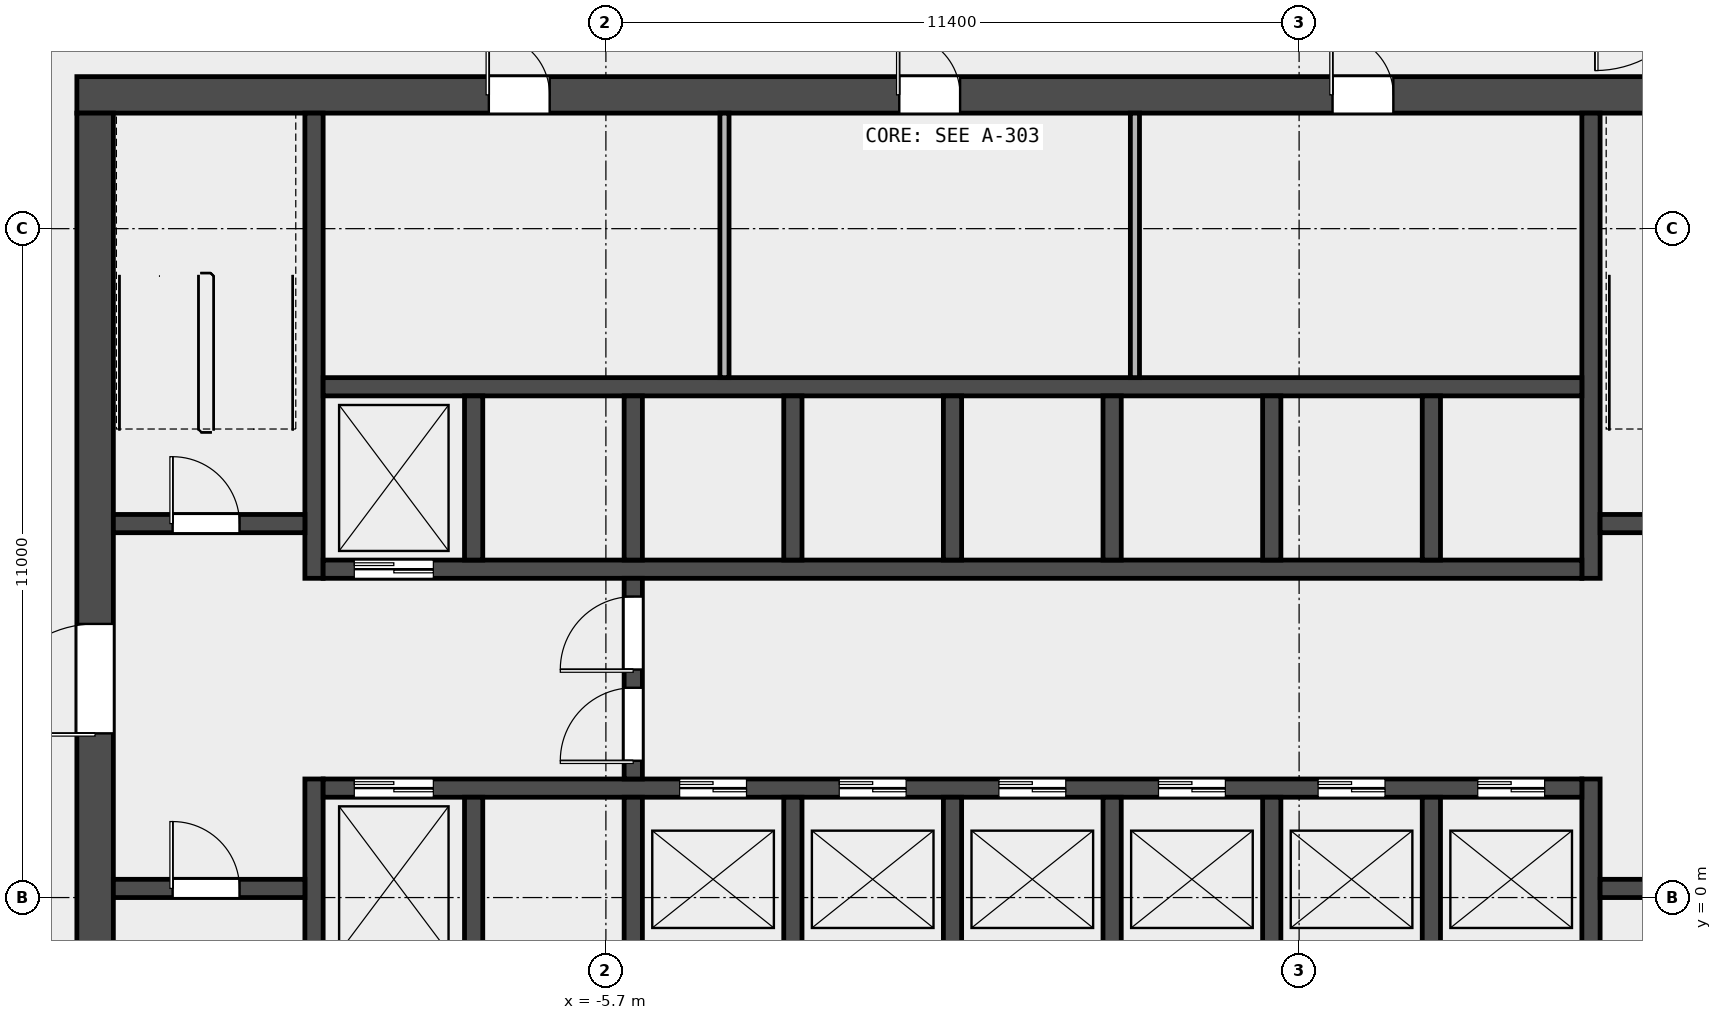
"""IFC4 building model, lengths in metres.
Left out: names, types, materials, properties, quantities, classifications, styles, units other than length and angle.
Written with IfcOpenShell. Run it as: python <this file> out.ifc"""

import sys

from ifc_helpers import new_model, si_unit, direction, frame, frame_2d, origin, place, context, subcontext, project, spatial, rectangle, extrude, element, fill, save


model = new_model("IFC4")
c1 = context("Model", 3, precision=1e-05, world=origin(), true_north=direction((0.0, 1.0)))
c2 = subcontext(c1, "Body", "Model", "MODEL_VIEW")
j1 = project(units=[si_unit("LENGTHUNIT", "METRE"), si_unit("PLANEANGLEUNIT", "RADIAN")], contexts=[c1])
p1 = place(None, origin())
s1 = spatial("IfcSite", under=j1, at=p1, CompositionType="ELEMENT")
p2 = place(p1, origin())
s2 = spatial("IfcBuilding", under=s1, at=p2, CompositionType="ELEMENT")
p3 = place(p2, frame((0.0, 0.0, 25.5)))
s3 = spatial("IfcBuildingStorey", under=s2, at=p3, CompositionType="ELEMENT", Elevation=25.5)
p4 = place(p3, frame((-14.4, 13.2, 0.0), z_axis=(0.0, 0.0, 1.0), x_axis=(1.0, 0.0, 0.0)))
e1 = element("IfcWall", 1, at=p4, inside=s3, PredefinedType="SHEAR", context=c2, shape_type="SweptSolid", body=[
    extrude(rectangle(XDim=28.8, YDim=0.6, at=frame_2d((14.4, 0.0))), origin(), (0.0, 0.0, 1.0), 5.2),
])
p5 = place(p4, frame((6.775, 0.0, 0.0)))
e2 = element("IfcOpeningElement", 2, at=p5, cuts=e1, PredefinedType="OPENING", context=c2, shape_type="SweptSolid", body=[
    extrude(rectangle(XDim=1.0, YDim=2.1, at=frame_2d((0.5, 1.05))), frame((0.0, 0.312, 0.0), z_axis=(0.0, -1.0, 0.0), x_axis=(1.0, 0.0, 0.0)), (0.0, 0.0, 1.0), 0.624),
])
p6 = place(p4, frame((13.525, 0.0, 0.0)))
e3 = element("IfcOpeningElement", 3, at=p6, cuts=e1, PredefinedType="OPENING", context=c2, shape_type="SweptSolid", body=[
    extrude(rectangle(XDim=1.0, YDim=2.1, at=frame_2d((0.5, 1.05))), frame((0.0, 0.312, 0.0), z_axis=(0.0, -1.0, 0.0), x_axis=(1.0, 0.0, 0.0)), (0.0, 0.0, 1.0), 0.624),
])
p7 = place(p4, frame((20.65, 0.0, 0.0)))
e4 = element("IfcOpeningElement", 4, at=p7, cuts=e1, PredefinedType="OPENING", context=c2, shape_type="SweptSolid", body=[
    extrude(rectangle(XDim=1.0, YDim=2.1, at=frame_2d((0.5, 1.05))), frame((0.0, 0.312, 0.0), z_axis=(0.0, -1.0, 0.0), x_axis=(1.0, 0.0, 0.0)), (0.0, 0.0, 1.0), 0.624),
])
p8 = place(p3, frame((-14.1, -6.6, 0.0), z_axis=(0.0, 0.0, 1.0), x_axis=(0.0, 1.0, 0.0)))
e5 = element("IfcWall", 5, at=p8, inside=s3, PredefinedType="SHEAR", context=c2, shape_type="SweptSolid", body=[
    extrude(rectangle(XDim=19.5, YDim=0.6, at=frame_2d((9.75, 0.0))), origin(), (0.0, 0.0, 1.0), 5.2),
])
p9 = place(p8, frame((9.3, 0.0, 0.0)))
e6 = element("IfcOpeningElement", 6, at=p9, cuts=e5, PredefinedType="OPENING", context=c2, shape_type="SweptSolid", body=[
    extrude(rectangle(XDim=1.8, YDim=2.1, at=frame_2d((0.9, 1.05))), frame((0.0, 0.312, 0.0), z_axis=(0.0, -1.0, 0.0), x_axis=(1.0, 0.0, 0.0)), (0.0, 0.0, 1.0), 0.624),
])
p10 = place(p3, frame((-10.5, -6.6, 0.0), z_axis=(0.0, 0.0, 1.0), x_axis=(0.0, 1.0, 0.0)))
e7 = element("IfcWall", 7, at=p10, inside=s3, PredefinedType="SHEAR", context=c2, shape_type="SweptSolid", body=[
    extrude(rectangle(XDim=8.55, YDim=0.3, at=frame_2d((4.275, 0.0))), origin(), (0.0, 0.0, 1.0), 5.2),
])
p11 = place(p3, frame((-10.5, 5.25, 0.0), z_axis=(0.0, 0.0, 1.0), x_axis=(0.0, 1.0, 0.0)))
e8 = element("IfcWall", 8, at=p11, inside=s3, PredefinedType="SHEAR", context=c2, shape_type="SweptSolid", body=[
    extrude(rectangle(XDim=7.65, YDim=0.3, at=frame_2d((3.825, 0.0))), origin(), (0.0, 0.0, 1.0), 5.2),
])
p12 = place(p3, frame((10.5, -6.6, 0.0), z_axis=(0.0, 0.0, 1.0), x_axis=(0.0, 1.0, 0.0)))
e9 = element("IfcWall", 9, at=p12, inside=s3, PredefinedType="SHEAR", context=c2, shape_type="SweptSolid", body=[
    extrude(rectangle(XDim=8.55, YDim=0.3, at=frame_2d((4.275, 0.0))), origin(), (0.0, 0.0, 1.0), 5.2),
])
p13 = place(p3, frame((10.5, 5.25, 0.0), z_axis=(0.0, 0.0, 1.0), x_axis=(0.0, 1.0, 0.0)))
e10 = element("IfcWall", 10, at=p13, inside=s3, PredefinedType="SHEAR", context=c2, shape_type="SweptSolid", body=[
    extrude(rectangle(XDim=7.65, YDim=0.3, at=frame_2d((3.825, 0.0))), origin(), (0.0, 0.0, 1.0), 5.2),
])
p14 = place(p3, frame((-13.8, 0.15, 0.0), z_axis=(0.0, 0.0, 1.0), x_axis=(1.0, 0.0, 0.0)))
e11 = element("IfcWall", 11, at=p14, inside=s3, PredefinedType="SOLIDWALL", context=c2, shape_type="SweptSolid", body=[
    extrude(rectangle(XDim=3.15, YDim=0.3, at=frame_2d((1.575, 0.0))), origin(), (0.0, 0.0, 1.0), 5.2),
])
p15 = place(p14, frame((0.975, 0.0, 0.0)))
e12 = element("IfcOpeningElement", 12, at=p15, cuts=e11, PredefinedType="OPENING", context=c2, shape_type="SweptSolid", body=[
    extrude(rectangle(XDim=1.1, YDim=2.1, at=frame_2d((0.55, 1.05))), frame((0.0, 0.162, 0.0), z_axis=(0.0, -1.0, 0.0), x_axis=(1.0, 0.0, 0.0)), (0.0, 0.0, 1.0), 0.324),
])
p16 = place(p3, frame((-13.8, 6.15, 0.0), z_axis=(0.0, 0.0, 1.0), x_axis=(1.0, 0.0, 0.0)))
e13 = element("IfcWall", 13, at=p16, inside=s3, PredefinedType="SOLIDWALL", context=c2, shape_type="SweptSolid", body=[
    extrude(rectangle(XDim=3.15, YDim=0.3, at=frame_2d((1.575, 0.0))), origin(), (0.0, 0.0, 1.0), 5.2),
])
p17 = place(p16, frame((0.975, 0.0, 0.0)))
e14 = element("IfcOpeningElement", 14, at=p17, cuts=e13, PredefinedType="OPENING", context=c2, shape_type="SweptSolid", body=[
    extrude(rectangle(XDim=1.1, YDim=2.1, at=frame_2d((0.55, 1.05))), frame((0.0, 0.162, 0.0), z_axis=(0.0, -1.0, 0.0), x_axis=(1.0, 0.0, 0.0)), (0.0, 0.0, 1.0), 0.324),
])
p18 = place(p3, frame((10.65, 0.15, 0.0), z_axis=(0.0, 0.0, 1.0), x_axis=(1.0, 0.0, 0.0)))
e15 = element("IfcWall", 15, at=p18, inside=s3, PredefinedType="SOLIDWALL", context=c2, shape_type="SweptSolid", body=[
    extrude(rectangle(XDim=3.15, YDim=0.3, at=frame_2d((1.575, 0.0))), origin(), (0.0, 0.0, 1.0), 5.2),
])
p19 = place(p18, frame((1.025, 0.0, 0.0)))
e16 = element("IfcOpeningElement", 16, at=p19, cuts=e15, PredefinedType="OPENING", context=c2, shape_type="SweptSolid", body=[
    extrude(rectangle(XDim=1.1, YDim=2.1, at=frame_2d((0.55, 1.05))), frame((0.0, 0.162, 0.0), z_axis=(0.0, -1.0, 0.0), x_axis=(1.0, 0.0, 0.0)), (0.0, 0.0, 1.0), 0.324),
])
p20 = place(p3, frame((10.65, 6.15, 0.0), z_axis=(0.0, 0.0, 1.0), x_axis=(1.0, 0.0, 0.0)))
e17 = element("IfcWall", 17, at=p20, inside=s3, PredefinedType="SOLIDWALL", context=c2, shape_type="SweptSolid", body=[
    extrude(rectangle(XDim=3.15, YDim=0.3, at=frame_2d((1.575, 0.0))), origin(), (0.0, 0.0, 1.0), 5.2),
])
p21 = place(p20, frame((1.025, 0.0, 0.0)))
e18 = element("IfcOpeningElement", 18, at=p21, cuts=e17, PredefinedType="OPENING", context=c2, shape_type="SweptSolid", body=[
    extrude(rectangle(XDim=1.1, YDim=2.1, at=frame_2d((0.55, 1.05))), frame((0.0, 0.162, 0.0), z_axis=(0.0, -1.0, 0.0), x_axis=(1.0, 0.0, 0.0)), (0.0, 0.0, 1.0), 0.324),
])
p22 = place(p3, frame((-10.35, 1.8, 0.0), z_axis=(0.0, 0.0, 1.0), x_axis=(1.0, 0.0, 0.0)))
e19 = element("IfcWall", 19, at=p22, inside=s3, PredefinedType="SOLIDWALL", context=c2, shape_type="SweptSolid", body=[
    extrude(rectangle(XDim=20.7, YDim=0.3, at=frame_2d((10.35, 0.0))), origin(), (0.0, 0.0, 1.0), 5.2),
])
p23 = place(p22, frame((0.512, 0.0, 0.0)))
e20 = element("IfcOpeningElement", 20, at=p23, cuts=e19, PredefinedType="OPENING", context=c2, shape_type="SweptSolid", body=[
    extrude(rectangle(XDim=1.3, YDim=2.1, at=frame_2d((0.65, 1.05))), frame((0.0, 0.162, 0.0), z_axis=(0.0, -1.0, 0.0), x_axis=(1.0, 0.0, 0.0)), (0.0, 0.0, 1.0), 0.324),
])
p24 = place(p22, frame((5.863, 0.0, 0.0)))
e21 = element("IfcOpeningElement", 21, at=p24, cuts=e19, PredefinedType="OPENING", context=c2, shape_type="SweptSolid", body=[
    extrude(rectangle(XDim=1.1, YDim=2.1, at=frame_2d((0.55, 1.05))), frame((0.0, 0.162, 0.0), z_axis=(0.0, -1.0, 0.0), x_axis=(1.0, 0.0, 0.0)), (0.0, 0.0, 1.0), 0.324),
])
p25 = place(p22, frame((8.488, 0.0, 0.0)))
e22 = element("IfcOpeningElement", 22, at=p25, cuts=e19, PredefinedType="OPENING", context=c2, shape_type="SweptSolid", body=[
    extrude(rectangle(XDim=1.1, YDim=2.1, at=frame_2d((0.55, 1.05))), frame((0.0, 0.162, 0.0), z_axis=(0.0, -1.0, 0.0), x_axis=(1.0, 0.0, 0.0)), (0.0, 0.0, 1.0), 0.324),
])
p26 = place(p22, frame((11.113, 0.0, 0.0)))
e23 = element("IfcOpeningElement", 23, at=p26, cuts=e19, PredefinedType="OPENING", context=c2, shape_type="SweptSolid", body=[
    extrude(rectangle(XDim=1.1, YDim=2.1, at=frame_2d((0.55, 1.05))), frame((0.0, 0.162, 0.0), z_axis=(0.0, -1.0, 0.0), x_axis=(1.0, 0.0, 0.0)), (0.0, 0.0, 1.0), 0.324),
])
p27 = place(p22, frame((13.738, 0.0, 0.0)))
e24 = element("IfcOpeningElement", 24, at=p27, cuts=e19, PredefinedType="OPENING", context=c2, shape_type="SweptSolid", body=[
    extrude(rectangle(XDim=1.1, YDim=2.1, at=frame_2d((0.55, 1.05))), frame((0.0, 0.162, 0.0), z_axis=(0.0, -1.0, 0.0), x_axis=(1.0, 0.0, 0.0)), (0.0, 0.0, 1.0), 0.324),
])
p28 = place(p22, frame((16.363, 0.0, 0.0)))
e25 = element("IfcOpeningElement", 25, at=p28, cuts=e19, PredefinedType="OPENING", context=c2, shape_type="SweptSolid", body=[
    extrude(rectangle(XDim=1.1, YDim=2.1, at=frame_2d((0.55, 1.05))), frame((0.0, 0.162, 0.0), z_axis=(0.0, -1.0, 0.0), x_axis=(1.0, 0.0, 0.0)), (0.0, 0.0, 1.0), 0.324),
])
p29 = place(p22, frame((18.988, 0.0, 0.0)))
e26 = element("IfcOpeningElement", 26, at=p29, cuts=e19, PredefinedType="OPENING", context=c2, shape_type="SweptSolid", body=[
    extrude(rectangle(XDim=1.1, YDim=2.1, at=frame_2d((0.55, 1.05))), frame((0.0, 0.162, 0.0), z_axis=(0.0, -1.0, 0.0), x_axis=(1.0, 0.0, 0.0)), (0.0, 0.0, 1.0), 0.324),
])
p30 = place(p3, frame((-10.35, 5.4, 0.0), z_axis=(0.0, 0.0, 1.0), x_axis=(1.0, 0.0, 0.0)))
e27 = element("IfcWall", 27, at=p30, inside=s3, PredefinedType="SOLIDWALL", context=c2, shape_type="SweptSolid", body=[
    extrude(rectangle(XDim=20.7, YDim=0.3, at=frame_2d((10.35, 0.0))), origin(), (0.0, 0.0, 1.0), 5.2),
])
p31 = place(p30, frame((0.512, 0.0, 0.0)))
e28 = element("IfcOpeningElement", 28, at=p31, cuts=e27, PredefinedType="OPENING", context=c2, shape_type="SweptSolid", body=[
    extrude(rectangle(XDim=1.3, YDim=2.1, at=frame_2d((0.65, 1.05))), frame((0.0, 0.162, 0.0), z_axis=(0.0, -1.0, 0.0), x_axis=(1.0, 0.0, 0.0)), (0.0, 0.0, 1.0), 0.324),
])
p32 = place(p3, frame((-10.35, 8.4, 0.0), z_axis=(0.0, 0.0, 1.0), x_axis=(1.0, 0.0, 0.0)))
e29 = element("IfcWall", 29, at=p32, inside=s3, PredefinedType="SOLIDWALL", context=c2, shape_type="SweptSolid", body=[
    extrude(rectangle(XDim=20.7, YDim=0.3, at=frame_2d((10.35, 0.0))), origin(), (0.0, 0.0, 1.0), 5.2),
])
for number, where, z_axis, x_axis in (
    (30, (-7.875, -1.05, 0.0), (0.0, 0.0, 1.0), (0.0, 1.0, 0.0)),
    (31, (-5.25, -1.05, 0.0), (0.0, 0.0, 1.0), (0.0, 1.0, 0.0)),
    (32, (-2.625, -1.05, 0.0), (0.0, 0.0, 1.0), (0.0, 1.0, 0.0)),
    (33, (0.0, -1.05, 0.0), (0.0, 0.0, 1.0), (0.0, 1.0, 0.0)),
    (34, (2.625, -1.05, 0.0), (0.0, 0.0, 1.0), (0.0, 1.0, 0.0)),
    (35, (5.25, -1.05, 0.0), (0.0, 0.0, 1.0), (0.0, 1.0, 0.0)),
    (36, (7.875, -1.05, 0.0), (0.0, 0.0, 1.0), (0.0, 1.0, 0.0)),
    (37, (-7.875, 5.55, 0.0), (0.0, 0.0, 1.0), (0.0, 1.0, 0.0)),
    (38, (-5.25, 5.55, 0.0), (0.0, 0.0, 1.0), (0.0, 1.0, 0.0)),
    (39, (-2.625, 5.55, 0.0), (0.0, 0.0, 1.0), (0.0, 1.0, 0.0)),
    (40, (0.0, 5.55, 0.0), (0.0, 0.0, 1.0), (0.0, 1.0, 0.0)),
    (41, (2.625, 5.55, 0.0), (0.0, 0.0, 1.0), (0.0, 1.0, 0.0)),
    (42, (5.25, 5.55, 0.0), (0.0, 0.0, 1.0), (0.0, 1.0, 0.0)),
    (43, (7.875, 5.55, 0.0), (0.0, 0.0, 1.0), (0.0, 1.0, 0.0)),
):
    element("IfcWall", number, at=place(p3, frame(where, z_axis=z_axis, x_axis=x_axis)), inside=s3, PredefinedType="SOLIDWALL", context=c2, shape_type="SweptSolid", body=[
        extrude(rectangle(XDim=2.7, YDim=0.3, at=frame_2d((1.35, 0.0))), origin(), (0.0, 0.0, 1.0), 5.2),
    ])
p33 = place(p3, frame((-5.25, 1.95, 0.0), z_axis=(0.0, 0.0, 1.0), x_axis=(0.0, 1.0, 0.0)))
e44 = element("IfcWall", 44, at=p33, inside=s3, PredefinedType="SOLIDWALL", context=c2, shape_type="SweptSolid", body=[
    extrude(rectangle(XDim=3.3, YDim=0.3, at=frame_2d((1.65, 0.0))), origin(), (0.0, 0.0, 1.0), 5.2),
])
p34 = place(p33, frame((0.3, 0.0, 0.0)))
e45 = element("IfcOpeningElement", 45, at=p34, cuts=e44, PredefinedType="OPENING", context=c2, shape_type="SweptSolid", body=[
    extrude(rectangle(XDim=1.2, YDim=2.1, at=frame_2d((0.6, 1.05))), frame((0.0, 0.162, 0.0), z_axis=(0.0, -1.0, 0.0), x_axis=(1.0, 0.0, 0.0)), (0.0, 0.0, 1.0), 0.324),
])
p35 = place(p33, frame((1.8, 0.0, 0.0)))
e46 = element("IfcOpeningElement", 46, at=p35, cuts=e44, PredefinedType="OPENING", context=c2, shape_type="SweptSolid", body=[
    extrude(rectangle(XDim=1.2, YDim=2.1, at=frame_2d((0.6, 1.05))), frame((0.0, 0.162, 0.0), z_axis=(0.0, -1.0, 0.0), x_axis=(1.0, 0.0, 0.0)), (0.0, 0.0, 1.0), 0.324),
])
for number, where, z_axis, x_axis in (
    (47, (-3.75, 8.55, 0.0), (0.0, 0.0, 1.0), (0.0, 1.0, 0.0)),
    (48, (3.0, 8.55, 0.0), (0.0, 0.0, 1.0), (0.0, 1.0, 0.0)),
):
    element("IfcWall", number, at=place(p3, frame(where, z_axis=z_axis, x_axis=x_axis)), inside=s3, PredefinedType="PARTITIONING", context=c2, shape_type="SweptSolid", body=[
        extrude(rectangle(XDim=4.35, YDim=0.15, at=frame_2d((2.175, 0.0))), origin(), (0.0, 0.0, 1.0), 5.2),
    ])
p36 = place(p15, origin())
e49 = element("IfcDoor", 49, at=p36, inside=s3, OperationType="SINGLE_SWING_LEFT", PredefinedType="DOOR", context=c2, shape_type="SweptSolid", body=[
    extrude(rectangle(XDim=1.1, YDim=2.1, at=frame_2d((0.55, 1.05))), frame((0.0, 0.025, 0.0), z_axis=(0.0, -1.0, 0.0), x_axis=(1.0, 0.0, 0.0)), (0.0, 0.0, 1.0), 0.05),
])
fill(e12, e49)
p37 = place(p17, origin())
e50 = element("IfcDoor", 50, at=p37, inside=s3, OperationType="SINGLE_SWING_LEFT", PredefinedType="DOOR", context=c2, shape_type="SweptSolid", body=[
    extrude(rectangle(XDim=1.1, YDim=2.1, at=frame_2d((0.55, 1.05))), frame((0.0, 0.025, 0.0), z_axis=(0.0, -1.0, 0.0), x_axis=(1.0, 0.0, 0.0)), (0.0, 0.0, 1.0), 0.05),
])
fill(e14, e50)
p38 = place(p9, origin())
e51 = element("IfcDoor", 51, at=p38, inside=s3, OperationType="DOUBLE_DOOR_SINGLE_SWING", PredefinedType="DOOR", context=c2, shape_type="SweptSolid", body=[
    extrude(rectangle(XDim=1.8, YDim=2.1, at=frame_2d((0.9, 1.05))), frame((0.0, 0.025, 0.0), z_axis=(0.0, -1.0, 0.0), x_axis=(1.0, 0.0, 0.0)), (0.0, 0.0, 1.0), 0.05),
])
fill(e6, e51)
p39 = place(p34, origin())
e52 = element("IfcDoor", 52, at=p39, inside=s3, OperationType="SINGLE_SWING_LEFT", PredefinedType="DOOR", context=c2, shape_type="SweptSolid", body=[
    extrude(rectangle(XDim=1.2, YDim=2.1, at=frame_2d((0.6, 1.05))), frame((0.0, 0.025, 0.0), z_axis=(0.0, -1.0, 0.0), x_axis=(1.0, 0.0, 0.0)), (0.0, 0.0, 1.0), 0.05),
])
fill(e45, e52)
p40 = place(p35, origin())
e53 = element("IfcDoor", 53, at=p40, inside=s3, OperationType="SINGLE_SWING_RIGHT", PredefinedType="DOOR", context=c2, shape_type="SweptSolid", body=[
    extrude(rectangle(XDim=1.2, YDim=2.1, at=frame_2d((0.6, 1.05))), frame((0.0, 0.025, 0.0), z_axis=(0.0, -1.0, 0.0), x_axis=(1.0, 0.0, 0.0)), (0.0, 0.0, 1.0), 0.05),
])
fill(e46, e53)
p41 = place(p23, origin())
e54 = element("IfcDoor", 54, at=p41, inside=s3, OperationType="DOUBLE_DOOR_SLIDING", PredefinedType="DOOR", context=c2, shape_type="SweptSolid", body=[
    extrude(rectangle(XDim=1.3, YDim=2.1, at=frame_2d((0.65, 1.05))), frame((0.0, 0.025, 0.0), z_axis=(0.0, -1.0, 0.0), x_axis=(1.0, 0.0, 0.0)), (0.0, 0.0, 1.0), 0.05),
])
fill(e20, e54)
p42 = place(p24, origin())
e55 = element("IfcDoor", 55, at=p42, inside=s3, OperationType="DOUBLE_DOOR_SLIDING", PredefinedType="DOOR", context=c2, shape_type="SweptSolid", body=[
    extrude(rectangle(XDim=1.1, YDim=2.1, at=frame_2d((0.55, 1.05))), frame((0.0, 0.025, 0.0), z_axis=(0.0, -1.0, 0.0), x_axis=(1.0, 0.0, 0.0)), (0.0, 0.0, 1.0), 0.05),
])
fill(e21, e55)
p43 = place(p25, origin())
e56 = element("IfcDoor", 56, at=p43, inside=s3, OperationType="DOUBLE_DOOR_SLIDING", PredefinedType="DOOR", context=c2, shape_type="SweptSolid", body=[
    extrude(rectangle(XDim=1.1, YDim=2.1, at=frame_2d((0.55, 1.05))), frame((0.0, 0.025, 0.0), z_axis=(0.0, -1.0, 0.0), x_axis=(1.0, 0.0, 0.0)), (0.0, 0.0, 1.0), 0.05),
])
fill(e22, e56)
p44 = place(p26, origin())
e57 = element("IfcDoor", 57, at=p44, inside=s3, OperationType="DOUBLE_DOOR_SLIDING", PredefinedType="DOOR", context=c2, shape_type="SweptSolid", body=[
    extrude(rectangle(XDim=1.1, YDim=2.1, at=frame_2d((0.55, 1.05))), frame((0.0, 0.025, 0.0), z_axis=(0.0, -1.0, 0.0), x_axis=(1.0, 0.0, 0.0)), (0.0, 0.0, 1.0), 0.05),
])
fill(e23, e57)
p45 = place(p27, origin())
e58 = element("IfcDoor", 58, at=p45, inside=s3, OperationType="DOUBLE_DOOR_SLIDING", PredefinedType="DOOR", context=c2, shape_type="SweptSolid", body=[
    extrude(rectangle(XDim=1.1, YDim=2.1, at=frame_2d((0.55, 1.05))), frame((0.0, 0.025, 0.0), z_axis=(0.0, -1.0, 0.0), x_axis=(1.0, 0.0, 0.0)), (0.0, 0.0, 1.0), 0.05),
])
fill(e24, e58)
p46 = place(p28, origin())
e59 = element("IfcDoor", 59, at=p46, inside=s3, OperationType="DOUBLE_DOOR_SLIDING", PredefinedType="DOOR", context=c2, shape_type="SweptSolid", body=[
    extrude(rectangle(XDim=1.1, YDim=2.1, at=frame_2d((0.55, 1.05))), frame((0.0, 0.025, 0.0), z_axis=(0.0, -1.0, 0.0), x_axis=(1.0, 0.0, 0.0)), (0.0, 0.0, 1.0), 0.05),
])
fill(e25, e59)
p47 = place(p29, origin())
e60 = element("IfcDoor", 60, at=p47, inside=s3, OperationType="DOUBLE_DOOR_SLIDING", PredefinedType="DOOR", context=c2, shape_type="SweptSolid", body=[
    extrude(rectangle(XDim=1.1, YDim=2.1, at=frame_2d((0.55, 1.05))), frame((0.0, 0.025, 0.0), z_axis=(0.0, -1.0, 0.0), x_axis=(1.0, 0.0, 0.0)), (0.0, 0.0, 1.0), 0.05),
])
fill(e26, e60)
p48 = place(p31, origin())
e61 = element("IfcDoor", 61, at=p48, inside=s3, OperationType="DOUBLE_DOOR_SLIDING", PredefinedType="DOOR", context=c2, shape_type="SweptSolid", body=[
    extrude(rectangle(XDim=1.3, YDim=2.1, at=frame_2d((0.65, 1.05))), frame((0.0, 0.025, 0.0), z_axis=(0.0, -1.0, 0.0), x_axis=(1.0, 0.0, 0.0)), (0.0, 0.0, 1.0), 0.05),
])
fill(e28, e61)
p49 = place(p5, origin())
e62 = element("IfcDoor", 62, at=p49, inside=s3, OperationType="SINGLE_SWING_LEFT", PredefinedType="DOOR", context=c2, shape_type="SweptSolid", body=[
    extrude(rectangle(XDim=1.0, YDim=2.1, at=frame_2d((0.5, 1.05))), frame((0.0, 0.025, 0.0), z_axis=(0.0, -1.0, 0.0), x_axis=(1.0, 0.0, 0.0)), (0.0, 0.0, 1.0), 0.05),
])
fill(e2, e62)
p50 = place(p6, origin())
e63 = element("IfcDoor", 63, at=p50, inside=s3, OperationType="SINGLE_SWING_LEFT", PredefinedType="DOOR", context=c2, shape_type="SweptSolid", body=[
    extrude(rectangle(XDim=1.0, YDim=2.1, at=frame_2d((0.5, 1.05))), frame((0.0, 0.025, 0.0), z_axis=(0.0, -1.0, 0.0), x_axis=(1.0, 0.0, 0.0)), (0.0, 0.0, 1.0), 0.05),
])
fill(e3, e63)
p51 = place(p7, origin())
e64 = element("IfcDoor", 64, at=p51, inside=s3, OperationType="SINGLE_SWING_LEFT", PredefinedType="DOOR", context=c2, shape_type="SweptSolid", body=[
    extrude(rectangle(XDim=1.0, YDim=2.1, at=frame_2d((0.5, 1.05))), frame((0.0, 0.025, 0.0), z_axis=(0.0, -1.0, 0.0), x_axis=(1.0, 0.0, 0.0)), (0.0, 0.0, 1.0), 0.05),
])
fill(e4, e64)
save(model, sys.argv[1])
